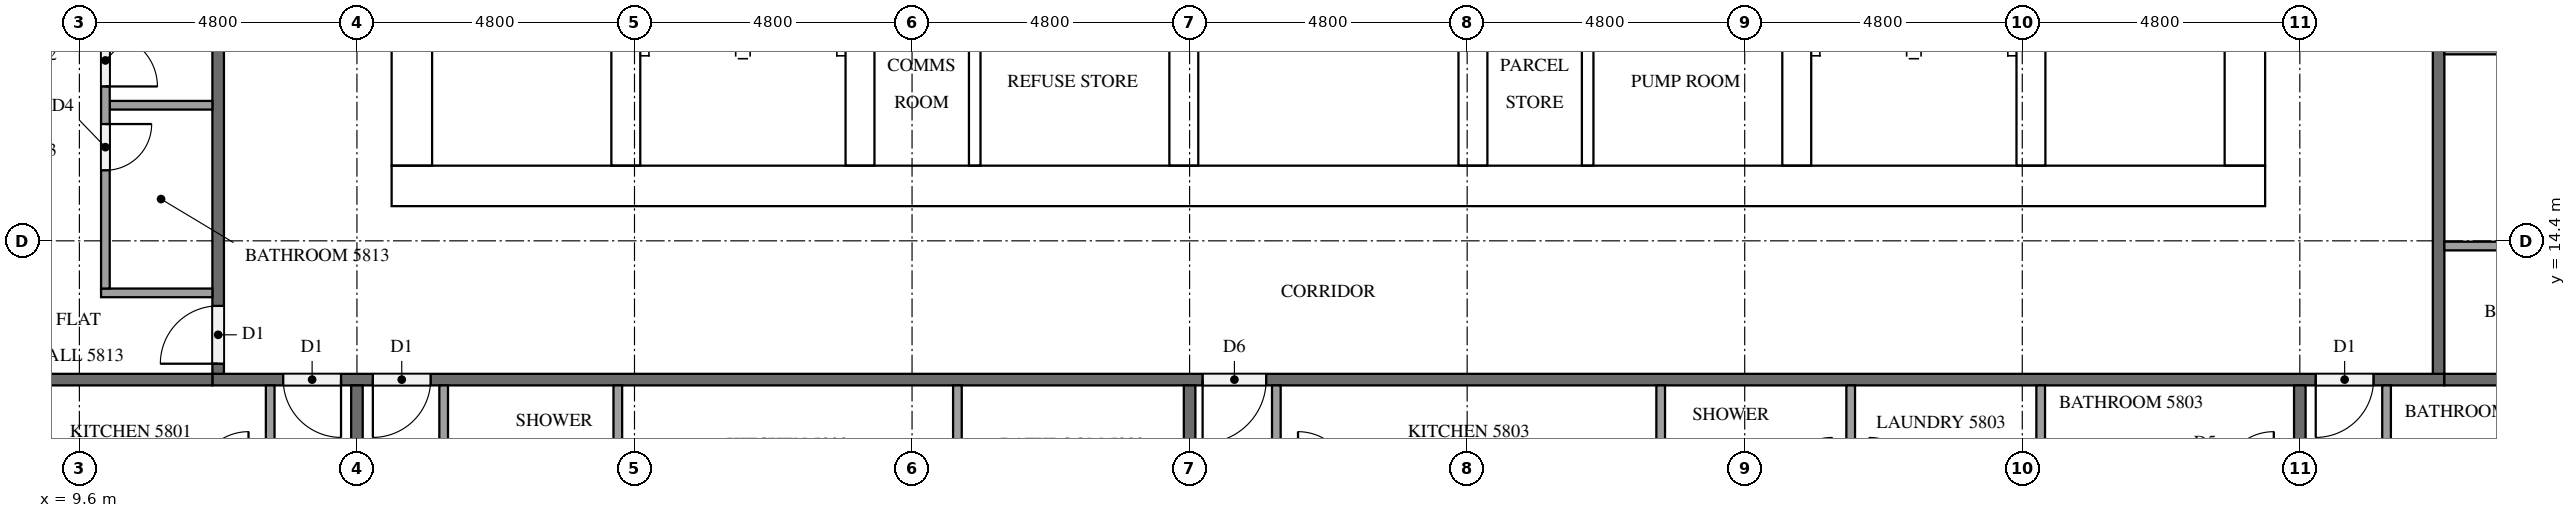
"""IFC4 building model, lengths in metres.
Left out: names, types, materials, properties, quantities, classifications, styles, units other than length and angle.
Written with IfcOpenShell. Run it as: python <this file> out.ifc"""

import sys

from ifc_helpers import new_model, si_unit, direction, frame, frame_2d, origin, place, context, subcontext, project, spatial, rectangle, extrude, element, fill, save


model = new_model("IFC4")
c1 = context("Model", 3, precision=1e-05, world=origin(), true_north=direction((0.0, 1.0)))
c2 = subcontext(c1, "Body", "Model", "MODEL_VIEW")
j1 = project(units=[si_unit("LENGTHUNIT", "METRE"), si_unit("PLANEANGLEUNIT", "RADIAN")], contexts=[c1])
p1 = place(None, origin())
s1 = spatial("IfcSite", under=j1, at=p1, CompositionType="ELEMENT")
p2 = place(p1, origin())
s2 = spatial("IfcBuilding", under=s1, at=p2, CompositionType="ELEMENT")
p3 = place(p2, frame((0.0, 0.0, 222.8)))
s3 = spatial("IfcBuildingStorey", under=s2, at=p3, CompositionType="ELEMENT", Elevation=222.8)
p4 = place(p3, frame((15.0, 15.35, 0.0), z_axis=(0.0, 0.0, 1.0), x_axis=(1.0, 0.0, 0.0)))
e1 = element("IfcWall", 1, at=p4, inside=s3, PredefinedType="SHEAR", context=c2, shape_type="SweptSolid", body=[
    extrude(rectangle(XDim=32.4, YDim=0.7, at=frame_2d((16.2, 0.0))), origin(), (0.0, 0.0, 1.0), 3.2),
])
p5 = place(p4, frame((15.3, 0.0, 0.0)))
e2 = element("IfcOpeningElement", 2, at=p5, cuts=e1, PredefinedType="OPENING", context=c2, shape_type="SweptSolid", body=[
    extrude(rectangle(XDim=1.8, YDim=2.1, at=frame_2d((0.9, 1.05))), frame((0.0, 0.36, 0.0), z_axis=(0.0, -1.0, 0.0), x_axis=(1.0, 0.0, 0.0)), (0.0, 0.0, 1.0), 0.72),
])
p6 = place(p3, frame((15.35, 15.7, 0.0), z_axis=(0.0, 0.0, 1.0), x_axis=(0.0, 1.0, 0.0)))
e3 = element("IfcWall", 3, at=p6, inside=s3, PredefinedType="SHEAR", context=c2, shape_type="SweptSolid", body=[
    extrude(rectangle(XDim=21.4, YDim=0.7, at=frame_2d((10.7, 0.0))), origin(), (0.0, 0.0, 1.0), 3.2),
])
p7 = place(p6, frame((5.06, 0.0, 0.0)))
e4 = element("IfcOpeningElement", 4, at=p7, cuts=e3, PredefinedType="OPENING", context=c2, shape_type="SweptSolid", body=[
    extrude(rectangle(XDim=1.2, YDim=2.1, at=frame_2d((0.6, 1.05))), frame((0.0, 0.36, 0.0), z_axis=(0.0, -1.0, 0.0), x_axis=(1.0, 0.0, 0.0)), (0.0, 0.0, 1.0), 0.72),
])
p8 = place(p3, frame((47.05, 15.7, 0.0), z_axis=(0.0, 0.0, 1.0), x_axis=(0.0, 1.0, 0.0)))
e5 = element("IfcWall", 5, at=p8, inside=s3, PredefinedType="SHEAR", context=c2, shape_type="SweptSolid", body=[
    extrude(rectangle(XDim=21.4, YDim=0.7, at=frame_2d((10.7, 0.0))), origin(), (0.0, 0.0, 1.0), 3.2),
])
p9 = place(p8, frame((10.4, 0.0, 0.0)))
e6 = element("IfcOpeningElement", 6, at=p9, cuts=e5, PredefinedType="OPENING", context=c2, shape_type="SweptSolid", body=[
    extrude(rectangle(XDim=1.2, YDim=2.1, at=frame_2d((0.6, 1.05))), frame((0.0, 0.36, 0.0), z_axis=(0.0, -1.0, 0.0), x_axis=(1.0, 0.0, 0.0)), (0.0, 0.0, 1.0), 0.72),
])
p10 = place(p3, frame((19.05, 15.7, 0.0), z_axis=(0.0, 0.0, 1.0), x_axis=(0.0, 1.0, 0.0)))
e7 = element("IfcWall", 7, at=p10, inside=s3, PredefinedType="SHEAR", context=c2, shape_type="SweptSolid", body=[
    extrude(rectangle(XDim=15.3, YDim=0.5, at=frame_2d((7.65, 0.0))), origin(), (0.0, 0.0, 1.0), 3.2),
])
p11 = place(p10, frame((9.75, 0.0, 0.0)))
e8 = element("IfcOpeningElement", 8, at=p11, cuts=e7, PredefinedType="OPENING", context=c2, shape_type="SweptSolid", body=[
    extrude(rectangle(XDim=1.1, YDim=2.1, at=frame_2d((0.55, 1.05))), frame((0.0, 0.26, 0.0), z_axis=(0.0, -1.0, 0.0), x_axis=(1.0, 0.0, 0.0)), (0.0, 0.0, 1.0), 0.52),
])
p12 = place(p10, frame((13.25, 0.0, 0.0)))
e9 = element("IfcOpeningElement", 9, at=p12, cuts=e7, PredefinedType="OPENING", context=c2, shape_type="SweptSolid", body=[
    extrude(rectangle(XDim=1.1, YDim=2.1, at=frame_2d((0.55, 1.05))), frame((0.0, 0.26, 0.0), z_axis=(0.0, -1.0, 0.0), x_axis=(1.0, 0.0, 0.0)), (0.0, 0.0, 1.0), 0.52),
])
p13 = place(p10, frame((0.5, 0.0, 0.0)))
e10 = element("IfcOpeningElement", 10, at=p13, cuts=e7, PredefinedType="OPENING", context=c2, shape_type="SweptSolid", body=[
    extrude(rectangle(XDim=1.2, YDim=2.1, at=frame_2d((0.6, 1.05))), frame((0.0, 0.26, 0.0), z_axis=(0.0, -1.0, 0.0), x_axis=(1.0, 0.0, 0.0)), (0.0, 0.0, 1.0), 0.52),
])
p14 = place(p3, frame((23.1, 15.7, 0.0), z_axis=(0.0, 0.0, 1.0), x_axis=(0.0, 1.0, 0.0)))
e11 = element("IfcWall", 11, at=p14, inside=s3, PredefinedType="SHEAR", context=c2, shape_type="SweptSolid", body=[
    extrude(rectangle(XDim=21.4, YDim=0.5, at=frame_2d((10.7, 0.0))), origin(), (0.0, 0.0, 1.0), 3.2),
])
p15 = place(p3, frame((39.3, 15.7, 0.0), z_axis=(0.0, 0.0, 1.0), x_axis=(0.0, 1.0, 0.0)))
e12 = element("IfcWall", 12, at=p15, inside=s3, PredefinedType="SHEAR", context=c2, shape_type="SweptSolid", body=[
    extrude(rectangle(XDim=8.55, YDim=0.5, at=frame_2d((4.275, 0.0))), origin(), (0.0, 0.0, 1.0), 3.2),
])
p16 = place(p3, frame((43.35, 15.7, 0.0), z_axis=(0.0, 0.0, 1.0), x_axis=(0.0, 1.0, 0.0)))
e13 = element("IfcWall", 13, at=p16, inside=s3, PredefinedType="SHEAR", context=c2, shape_type="SweptSolid", body=[
    extrude(rectangle(XDim=8.55, YDim=0.5, at=frame_2d((4.275, 0.0))), origin(), (0.0, 0.0, 1.0), 3.2),
])
p17 = place(p16, frame((0.5, 0.0, 0.0)))
e14 = element("IfcOpeningElement", 14, at=p17, cuts=e13, PredefinedType="OPENING", context=c2, shape_type="SweptSolid", body=[
    extrude(rectangle(XDim=1.2, YDim=2.1, at=frame_2d((0.6, 1.05))), frame((0.0, 0.26, 0.0), z_axis=(0.0, -1.0, 0.0), x_axis=(1.0, 0.0, 0.0)), (0.0, 0.0, 1.0), 0.52),
])
for number, where, z_axis, x_axis in (
    (15, (28.7, 15.7, 0.0), (0.0, 0.0, 1.0), (0.0, 1.0, 0.0)),
    (16, (33.7, 15.7, 0.0), (0.0, 0.0, 1.0), (0.0, 1.0, 0.0)),
):
    element("IfcWall", number, at=place(p3, frame(where, z_axis=z_axis, x_axis=x_axis)), inside=s3, PredefinedType="SHEAR", context=c2, shape_type="SweptSolid", body=[
        extrude(rectangle(XDim=2.8, YDim=0.5, at=frame_2d((1.4, 0.0))), origin(), (0.0, 0.0, 1.0), 3.2),
    ])
for number, where, z_axis, x_axis in (
    (17, (25.084, 15.7, 0.0), (0.0, 0.0, 1.0), (0.0, 1.0, 0.0)),
    (18, (35.684, 15.7, 0.0), (0.0, 0.0, 1.0), (0.0, 1.0, 0.0)),
):
    element("IfcWall", number, at=place(p3, frame(where, z_axis=z_axis, x_axis=x_axis)), inside=s3, PredefinedType="PARTITIONING", context=c2, shape_type="SweptSolid", body=[
        extrude(rectangle(XDim=2.8, YDim=0.2, at=frame_2d((1.4, 0.0))), origin(), (0.0, 0.0, 1.0), 3.2),
    ])
p18 = place(p3, frame((50.5, 12.0, 0.0), z_axis=(0.0, 0.0, 1.0), x_axis=(-1.0, 0.0, 0.0)))
e19 = element("IfcWall", 19, at=p18, inside=s3, PredefinedType="PARTITIONING", context=c2, shape_type="SweptSolid", body=[
    extrude(rectangle(XDim=38.6, YDim=0.2, at=frame_2d((19.3, 0.0))), origin(), (0.0, 0.0, 1.0), 3.2),
])
p19 = place(p18, frame((36.375, 0.0, 0.0)))
e20 = element("IfcOpeningElement", 20, at=p19, cuts=e19, PredefinedType="OPENING", context=c2, shape_type="SweptSolid", body=[
    extrude(rectangle(XDim=1.0, YDim=2.1, at=frame_2d((0.5, 1.05))), frame((0.0, 0.11, 0.0), z_axis=(0.0, -1.0, 0.0), x_axis=(1.0, 0.0, 0.0)), (0.0, 0.0, 1.0), 0.22),
])
p20 = place(p18, frame((34.825, 0.0, 0.0)))
e21 = element("IfcOpeningElement", 21, at=p20, cuts=e19, PredefinedType="OPENING", context=c2, shape_type="SweptSolid", body=[
    extrude(rectangle(XDim=1.0, YDim=2.1, at=frame_2d((0.5, 1.05))), frame((0.0, 0.11, 0.0), z_axis=(0.0, -1.0, 0.0), x_axis=(1.0, 0.0, 0.0)), (0.0, 0.0, 1.0), 0.22),
])
p21 = place(p18, frame((20.375, 0.0, 0.0)))
e22 = element("IfcOpeningElement", 22, at=p21, cuts=e19, PredefinedType="OPENING", context=c2, shape_type="SweptSolid", body=[
    extrude(rectangle(XDim=1.1, YDim=2.1, at=frame_2d((0.55, 1.05))), frame((0.0, 0.11, 0.0), z_axis=(0.0, -1.0, 0.0), x_axis=(1.0, 0.0, 0.0)), (0.0, 0.0, 1.0), 0.22),
])
p22 = place(p18, frame((1.225, 0.0, 0.0)))
e23 = element("IfcOpeningElement", 23, at=p22, cuts=e19, PredefinedType="OPENING", context=c2, shape_type="SweptSolid", body=[
    extrude(rectangle(XDim=1.0, YDim=2.1, at=frame_2d((0.5, 1.05))), frame((0.0, 0.11, 0.0), z_axis=(0.0, -1.0, 0.0), x_axis=(1.0, 0.0, 0.0)), (0.0, 0.0, 1.0), 0.22),
])
p23 = place(p3, frame((50.4, 40.7, 0.0), z_axis=(0.0, 0.0, 1.0), x_axis=(0.0, -1.0, 0.0)))
e24 = element("IfcWall", 24, at=p23, inside=s3, PredefinedType="PARTITIONING", context=c2, shape_type="SweptSolid", body=[
    extrude(rectangle(XDim=28.6, YDim=0.2, at=frame_2d((14.3, 0.0))), origin(), (0.0, 0.0, 1.0), 3.2),
])
p24 = place(p23, frame((21.775, 0.0, 0.0)))
e25 = element("IfcOpeningElement", 25, at=p24, cuts=e24, PredefinedType="OPENING", context=c2, shape_type="SweptSolid", body=[
    extrude(rectangle(XDim=1.0, YDim=2.1, at=frame_2d((0.5, 1.05))), frame((0.0, 0.11, 0.0), z_axis=(0.0, -1.0, 0.0), x_axis=(1.0, 0.0, 0.0)), (0.0, 0.0, 1.0), 0.22),
])
p25 = place(p23, frame((7.375, 0.0, 0.0)))
e26 = element("IfcOpeningElement", 26, at=p25, cuts=e24, PredefinedType="OPENING", context=c2, shape_type="SweptSolid", body=[
    extrude(rectangle(XDim=1.0, YDim=2.1, at=frame_2d((0.5, 1.05))), frame((0.0, 0.11, 0.0), z_axis=(0.0, -1.0, 0.0), x_axis=(1.0, 0.0, 0.0)), (0.0, 0.0, 1.0), 0.22),
])
p26 = place(p23, frame((0.175, 0.0, 0.0)))
e27 = element("IfcOpeningElement", 27, at=p26, cuts=e24, PredefinedType="OPENING", context=c2, shape_type="SweptSolid", body=[
    extrude(rectangle(XDim=1.0, YDim=2.1, at=frame_2d((0.5, 1.05))), frame((0.0, 0.11, 0.0), z_axis=(0.0, -1.0, 0.0), x_axis=(1.0, 0.0, 0.0)), (0.0, 0.0, 1.0), 0.22),
])
p27 = place(p3, frame((12.0, 12.1, 0.0), z_axis=(0.0, 0.0, 1.0), x_axis=(0.0, 1.0, 0.0)))
e28 = element("IfcWall", 28, at=p27, inside=s3, PredefinedType="PARTITIONING", context=c2, shape_type="SweptSolid", body=[
    extrude(rectangle(XDim=28.6, YDim=0.2, at=frame_2d((14.3, 0.0))), origin(), (0.0, 0.0, 1.0), 3.2),
])
p28 = place(p27, frame((9.725, 0.0, 0.0)))
e29 = element("IfcOpeningElement", 29, at=p28, cuts=e28, PredefinedType="OPENING", context=c2, shape_type="SweptSolid", body=[
    extrude(rectangle(XDim=1.1, YDim=2.1, at=frame_2d((0.55, 1.05))), frame((0.0, 0.11, 0.0), z_axis=(0.0, -1.0, 0.0), x_axis=(1.0, 0.0, 0.0)), (0.0, 0.0, 1.0), 0.22),
])
p29 = place(p27, frame((0.175, 0.0, 0.0)))
e30 = element("IfcOpeningElement", 30, at=p29, cuts=e28, PredefinedType="OPENING", context=c2, shape_type="SweptSolid", body=[
    extrude(rectangle(XDim=1.0, YDim=2.1, at=frame_2d((0.5, 1.05))), frame((0.0, 0.11, 0.0), z_axis=(0.0, -1.0, 0.0), x_axis=(1.0, 0.0, 0.0)), (0.0, 0.0, 1.0), 0.22),
])
for number, where, z_axis, x_axis in (
    (31, (14.4, 11.9, 0.0), (0.0, 0.0, 1.0), (0.0, -1.0, 0.0)),
    (32, (4.9, 12.0, 0.0), (0.0, 0.0, 1.0), (1.0, 0.0, 0.0)),
):
    element("IfcWall", number, at=place(p3, frame(where, z_axis=z_axis, x_axis=x_axis)), inside=s3, PredefinedType="PARTITIONING", context=c2, shape_type="SweptSolid", body=[
        extrude(rectangle(XDim=7.0, YDim=0.2, at=frame_2d((3.5, 0.0))), origin(), (0.0, 0.0, 1.0), 3.2),
    ])
for number, where, z_axis, x_axis in (
    (33, (28.8, 11.9, 0.0), (0.0, 0.0, 1.0), (0.0, -1.0, 0.0)),
    (34, (48.0, 11.9, 0.0), (0.0, 0.0, 1.0), (0.0, -1.0, 0.0)),
):
    element("IfcWall", number, at=place(p3, frame(where, z_axis=z_axis, x_axis=x_axis)), inside=s3, PredefinedType="PARTITIONING", context=c2, shape_type="SweptSolid", body=[
        extrude(rectangle(XDim=6.775, YDim=0.2, at=frame_2d((3.387, 0.0))), origin(), (0.0, 0.0, 1.0), 3.2),
    ])
p30 = place(p3, frame((50.5, 12.0, 0.0), z_axis=(0.0, 0.0, 1.0), x_axis=(1.0, 0.0, 0.0)))
e35 = element("IfcWall", 35, at=p30, inside=s3, PredefinedType="PARTITIONING", context=c2, shape_type="SweptSolid", body=[
    extrude(rectangle(XDim=11.8, YDim=0.2, at=frame_2d((5.9, 0.0))), origin(), (0.0, 0.0, 1.0), 3.2),
])
p31 = place(p3, frame((12.9, 11.9, 0.0), z_axis=(0.0, 0.0, 1.0), x_axis=(0.0, -1.0, 0.0)))
e36 = element("IfcWall", 36, at=p31, inside=s3, PredefinedType="PARTITIONING", context=c2, shape_type="SweptSolid", body=[
    extrude(rectangle(XDim=1.775, YDim=0.15, at=frame_2d((0.887, 0.0))), origin(), (0.0, 0.0, 1.0), 3.2),
])
for number, where, z_axis, x_axis in (
    (37, (18.912, 11.9, 0.0), (0.0, 0.0, 1.0), (0.0, -1.0, 0.0)),
    (38, (24.785, 11.9, 0.0), (0.0, 0.0, 1.0), (0.0, -1.0, 0.0)),
):
    element("IfcWall", number, at=place(p3, frame(where, z_axis=z_axis, x_axis=x_axis)), inside=s3, PredefinedType="PARTITIONING", context=c2, shape_type="SweptSolid", body=[
        extrude(rectangle(XDim=2.075, YDim=0.15, at=frame_2d((1.038, 0.0))), origin(), (0.0, 0.0, 1.0), 3.2),
    ])
p32 = place(p3, frame((15.9, 11.9, 0.0), z_axis=(0.0, 0.0, 1.0), x_axis=(0.0, -1.0, 0.0)))
e39 = element("IfcWall", 39, at=p32, inside=s3, PredefinedType="PARTITIONING", context=c2, shape_type="SweptSolid", body=[
    extrude(rectangle(XDim=2.225, YDim=0.15, at=frame_2d((1.112, 0.0))), origin(), (0.0, 0.0, 1.0), 3.2),
])
for number, where, z_axis, x_axis in (
    (40, (36.947, 11.9, 0.0), (0.0, 0.0, 1.0), (0.0, -1.0, 0.0)),
    (41, (40.233, 11.9, 0.0), (0.0, 0.0, 1.0), (0.0, -1.0, 0.0)),
    (42, (43.519, 11.9, 0.0), (0.0, 0.0, 1.0), (0.0, -1.0, 0.0)),
):
    element("IfcWall", number, at=place(p3, frame(where, z_axis=z_axis, x_axis=x_axis)), inside=s3, PredefinedType="PARTITIONING", context=c2, shape_type="SweptSolid", body=[
        extrude(rectangle(XDim=1.625, YDim=0.15, at=frame_2d((0.812, 0.0))), origin(), (0.0, 0.0, 1.0), 3.2),
    ])
p33 = place(p3, frame((30.3, 11.9, 0.0), z_axis=(0.0, 0.0, 1.0), x_axis=(0.0, -1.0, 0.0)))
e43 = element("IfcWall", 43, at=p33, inside=s3, PredefinedType="PARTITIONING", context=c2, shape_type="SweptSolid", body=[
    extrude(rectangle(XDim=1.775, YDim=0.15, at=frame_2d((0.887, 0.0))), origin(), (0.0, 0.0, 1.0), 3.2),
])
p34 = place(p3, frame((49.5, 11.9, 0.0), z_axis=(0.0, 0.0, 1.0), x_axis=(0.0, -1.0, 0.0)))
e44 = element("IfcWall", 44, at=p34, inside=s3, PredefinedType="PARTITIONING", context=c2, shape_type="SweptSolid", body=[
    extrude(rectangle(XDim=1.925, YDim=0.15, at=frame_2d((0.962, 0.0))), origin(), (0.0, 0.0, 1.0), 3.2),
])
p35 = place(p3, frame((50.5, 14.31, 0.0), z_axis=(0.0, 0.0, 1.0), x_axis=(1.0, 0.0, 0.0)))
e45 = element("IfcWall", 45, at=p35, inside=s3, PredefinedType="PARTITIONING", context=c2, shape_type="SweptSolid", body=[
    extrude(rectangle(XDim=3.875, YDim=0.15, at=frame_2d((1.938, 0.0))), origin(), (0.0, 0.0, 1.0), 3.2),
])
p36 = place(p3, frame((50.5, 17.7, 0.0), z_axis=(0.0, 0.0, 1.0), x_axis=(1.0, 0.0, 0.0)))
e46 = element("IfcWall", 46, at=p36, inside=s3, PredefinedType="PARTITIONING", context=c2, shape_type="SweptSolid", body=[
    extrude(rectangle(XDim=4.025, YDim=0.15, at=frame_2d((2.012, 0.0))), origin(), (0.0, 0.0, 1.0), 3.2),
])
p37 = place(p3, frame((11.9, 16.745, 0.0), z_axis=(0.0, 0.0, 1.0), x_axis=(-1.0, 0.0, 0.0)))
e47 = element("IfcWall", 47, at=p37, inside=s3, PredefinedType="PARTITIONING", context=c2, shape_type="SweptSolid", body=[
    extrude(rectangle(XDim=1.775, YDim=0.15, at=frame_2d((0.887, 0.0))), origin(), (0.0, 0.0, 1.0), 3.2),
])
p38 = place(p3, frame((11.9, 13.5, 0.0), z_axis=(0.0, 0.0, 1.0), x_axis=(-1.0, 0.0, 0.0)))
e48 = element("IfcWall", 48, at=p38, inside=s3, PredefinedType="PARTITIONING", context=c2, shape_type="SweptSolid", body=[
    extrude(rectangle(XDim=1.925, YDim=0.15, at=frame_2d((0.962, 0.0))), origin(), (0.0, 0.0, 1.0), 3.2),
])
p39 = place(p3, frame((10.05, 21.5, 0.0), z_axis=(0.0, 0.0, 1.0), x_axis=(0.0, -1.0, 0.0)))
e49 = element("IfcWall", 49, at=p39, inside=s3, PredefinedType="PARTITIONING", context=c2, shape_type="SweptSolid", body=[
    extrude(rectangle(XDim=7.925, YDim=0.15, at=frame_2d((3.962, 0.0))), origin(), (0.0, 0.0, 1.0), 3.2),
])
p40 = place(p39, frame((5.08, 0.0, 0.0)))
e50 = element("IfcOpeningElement", 50, at=p40, cuts=e49, PredefinedType="OPENING", context=c2, shape_type="SweptSolid", body=[
    extrude(rectangle(XDim=0.8, YDim=2.1, at=frame_2d((0.4, 1.05))), frame((0.0, 0.085, 0.0), z_axis=(0.0, -1.0, 0.0), x_axis=(1.0, 0.0, 0.0)), (0.0, 0.0, 1.0), 0.17),
])
p41 = place(p39, frame((3.53, 0.0, 0.0)))
e51 = element("IfcOpeningElement", 51, at=p41, cuts=e49, PredefinedType="OPENING", context=c2, shape_type="SweptSolid", body=[
    extrude(rectangle(XDim=0.9, YDim=2.1, at=frame_2d((0.45, 1.05))), frame((0.0, 0.085, 0.0), z_axis=(0.0, -1.0, 0.0), x_axis=(1.0, 0.0, 0.0)), (0.0, 0.0, 1.0), 0.17),
])
p42 = place(p13, frame((1.2, 0.0, 0.0), z_axis=(0.0, 0.0, 1.0), x_axis=(-1.0, 0.0, 0.0)))
e52 = element("IfcDoor", 52, at=p42, inside=s3, OperationType="SINGLE_SWING_RIGHT", PredefinedType="DOOR", context=c2, shape_type="SweptSolid", body=[
    extrude(rectangle(XDim=1.2, YDim=2.1, at=frame_2d((0.6, 1.05))), frame((0.0, 0.025, 0.0), z_axis=(0.0, -1.0, 0.0), x_axis=(1.0, 0.0, 0.0)), (0.0, 0.0, 1.0), 0.05),
])
fill(e10, e52)
p43 = place(p17, origin())
e53 = element("IfcDoor", 53, at=p43, inside=s3, OperationType="SINGLE_SWING_LEFT", PredefinedType="DOOR", context=c2, shape_type="SweptSolid", body=[
    extrude(rectangle(XDim=1.2, YDim=2.1, at=frame_2d((0.6, 1.05))), frame((0.0, 0.025, 0.0), z_axis=(0.0, -1.0, 0.0), x_axis=(1.0, 0.0, 0.0)), (0.0, 0.0, 1.0), 0.05),
])
fill(e14, e53)
p44 = place(p5, frame((1.8, 0.0, 0.0), z_axis=(0.0, 0.0, 1.0), x_axis=(-1.0, 0.0, 0.0)))
e54 = element("IfcDoor", 54, at=p44, inside=s3, OperationType="DOUBLE_DOOR_SINGLE_SWING", PredefinedType="DOOR", context=c2, shape_type="SweptSolid", body=[
    extrude(rectangle(XDim=1.8, YDim=2.1, at=frame_2d((0.9, 1.05))), frame((0.0, 0.025, 0.0), z_axis=(0.0, -1.0, 0.0), x_axis=(1.0, 0.0, 0.0)), (0.0, 0.0, 1.0), 0.05),
])
fill(e2, e54)
p45 = place(p19, origin())
e55 = element("IfcDoor", 55, at=p45, inside=s3, OperationType="SINGLE_SWING_LEFT", PredefinedType="DOOR", context=c2, shape_type="SweptSolid", body=[
    extrude(rectangle(XDim=1.0, YDim=2.1, at=frame_2d((0.5, 1.05))), frame((0.0, 0.025, 0.0), z_axis=(0.0, -1.0, 0.0), x_axis=(1.0, 0.0, 0.0)), (0.0, 0.0, 1.0), 0.05),
])
fill(e20, e55)
p46 = place(p20, origin())
e56 = element("IfcDoor", 56, at=p46, inside=s3, OperationType="SINGLE_SWING_RIGHT", PredefinedType="DOOR", context=c2, shape_type="SweptSolid", body=[
    extrude(rectangle(XDim=1.0, YDim=2.1, at=frame_2d((0.5, 1.05))), frame((0.0, 0.025, 0.0), z_axis=(0.0, -1.0, 0.0), x_axis=(1.0, 0.0, 0.0)), (0.0, 0.0, 1.0), 0.05),
])
fill(e21, e56)
p47 = place(p21, origin())
e57 = element("IfcDoor", 57, at=p47, inside=s3, OperationType="SINGLE_SWING_RIGHT", PredefinedType="DOOR", context=c2, shape_type="SweptSolid", body=[
    extrude(rectangle(XDim=1.1, YDim=2.1, at=frame_2d((0.55, 1.05))), frame((0.0, 0.025, 0.0), z_axis=(0.0, -1.0, 0.0), x_axis=(1.0, 0.0, 0.0)), (0.0, 0.0, 1.0), 0.05),
])
fill(e22, e57)
p48 = place(p22, origin())
e58 = element("IfcDoor", 58, at=p48, inside=s3, OperationType="SINGLE_SWING_RIGHT", PredefinedType="DOOR", context=c2, shape_type="SweptSolid", body=[
    extrude(rectangle(XDim=1.0, YDim=2.1, at=frame_2d((0.5, 1.05))), frame((0.0, 0.025, 0.0), z_axis=(0.0, -1.0, 0.0), x_axis=(1.0, 0.0, 0.0)), (0.0, 0.0, 1.0), 0.05),
])
fill(e23, e58)
p49 = place(p29, origin())
e59 = element("IfcDoor", 59, at=p49, inside=s3, OperationType="SINGLE_SWING_LEFT", PredefinedType="DOOR", context=c2, shape_type="SweptSolid", body=[
    extrude(rectangle(XDim=1.0, YDim=2.1, at=frame_2d((0.5, 1.05))), frame((0.0, 0.025, 0.0), z_axis=(0.0, -1.0, 0.0), x_axis=(1.0, 0.0, 0.0)), (0.0, 0.0, 1.0), 0.05),
])
fill(e30, e59)
p50 = place(p40, origin())
e60 = element("IfcDoor", 60, at=p50, inside=s3, OperationType="SINGLE_SWING_LEFT", PredefinedType="DOOR", context=c2, shape_type="SweptSolid", body=[
    extrude(rectangle(XDim=0.8, YDim=2.1, at=frame_2d((0.4, 1.05))), frame((0.0, 0.025, 0.0), z_axis=(0.0, -1.0, 0.0), x_axis=(1.0, 0.0, 0.0)), (0.0, 0.0, 1.0), 0.05),
])
fill(e50, e60)
p51 = place(p41, origin())
e61 = element("IfcDoor", 61, at=p51, inside=s3, OperationType="SINGLE_SWING_RIGHT", PredefinedType="DOOR", context=c2, shape_type="SweptSolid", body=[
    extrude(rectangle(XDim=0.9, YDim=2.1, at=frame_2d((0.45, 1.05))), frame((0.0, 0.025, 0.0), z_axis=(0.0, -1.0, 0.0), x_axis=(1.0, 0.0, 0.0)), (0.0, 0.0, 1.0), 0.05),
])
fill(e51, e61)
save(model, sys.argv[1])
